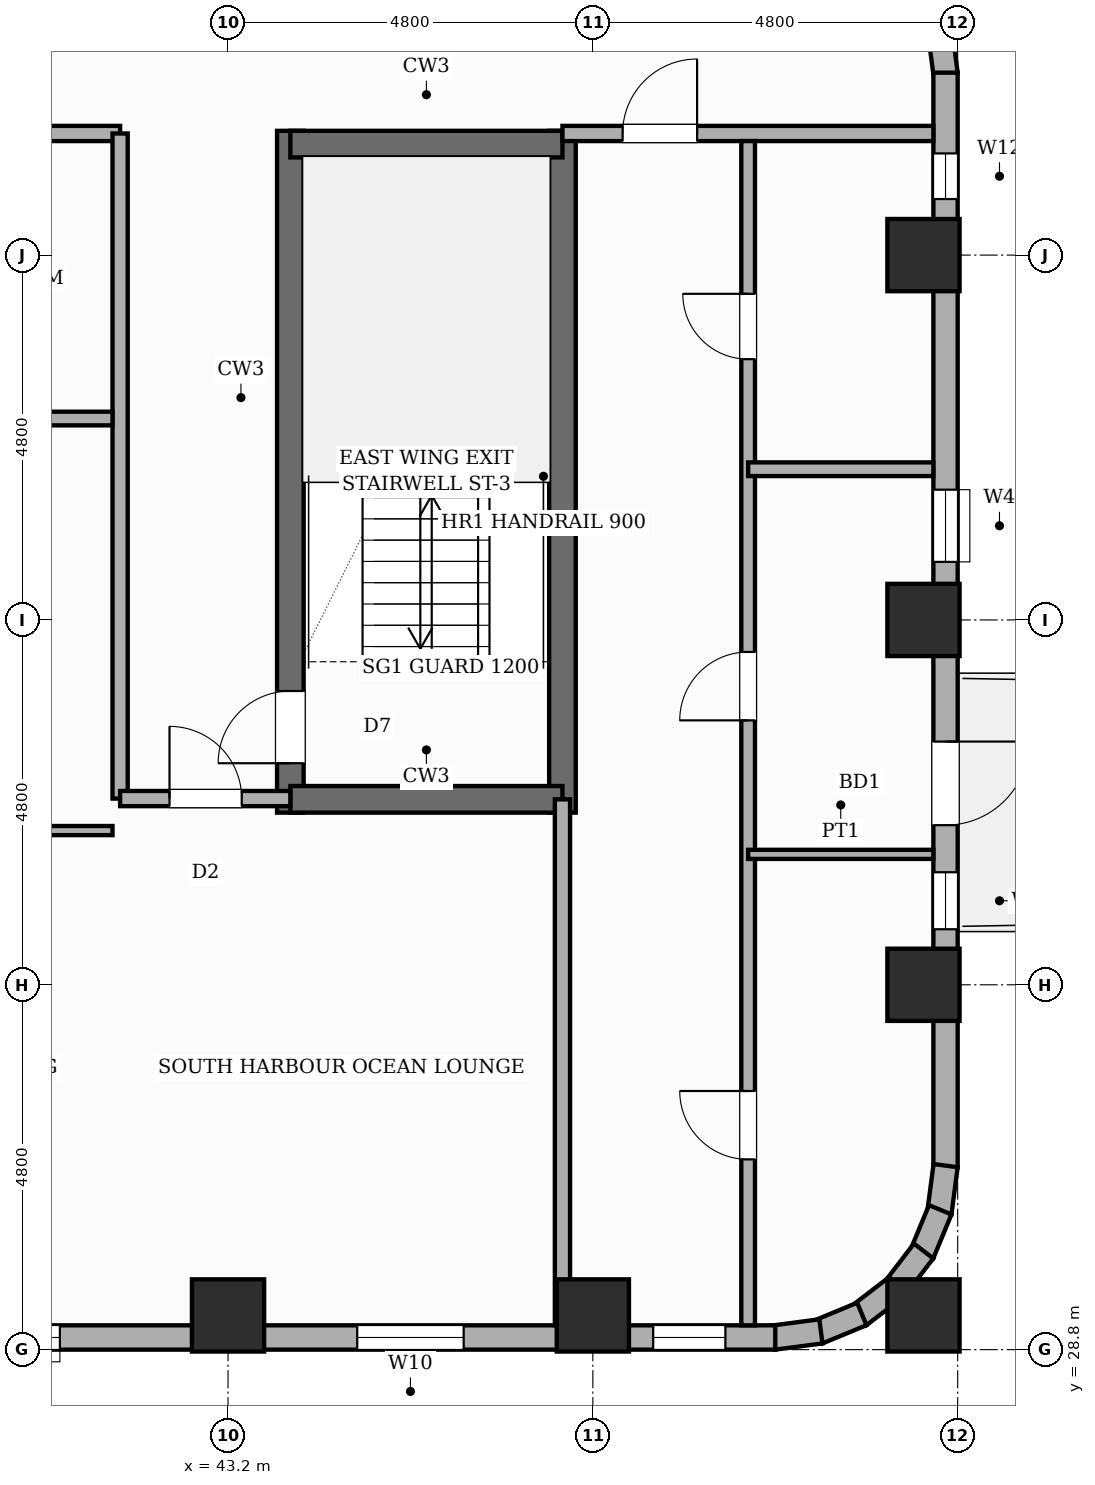
"""IFC4 building model, lengths in metres.
Left out: names, types, materials, properties, quantities, classifications, styles, units other than length and angle.
Written with IfcOpenShell. Run it as: python <this file> out.ifc"""

import sys

from ifc_helpers import new_model, si_unit, direction, frame, frame_2d, origin, origin_2d, place, context, subcontext, project, spatial, rectangle, extrude, element, fill, save


model = new_model("IFC4")
c1 = context("Model", 3, precision=1e-05, world=origin(), true_north=direction((0.0, 1.0)))
c2 = subcontext(c1, "Body", "Model", "MODEL_VIEW")
j1 = project(units=[si_unit("LENGTHUNIT", "METRE"), si_unit("PLANEANGLEUNIT", "RADIAN")], contexts=[c1])
p1 = place(None, origin())
s1 = spatial("IfcSite", under=j1, at=p1, CompositionType="ELEMENT")
p2 = place(p1, origin())
s2 = spatial("IfcBuilding", under=s1, at=p2, CompositionType="ELEMENT")
p3 = place(p2, frame((0.0, 0.0, 110.8)))
s3 = spatial("IfcBuildingStorey", under=s2, at=p3, CompositionType="ELEMENT", Elevation=110.8)
p4 = place(p3, frame((44.02, 35.865, 0.0), z_axis=(0.0, 0.0, 1.0), x_axis=(0.0, 1.0, 0.0)))
e1 = element("IfcWall", 1, at=p4, inside=s3, PredefinedType="SHEAR", context=c2, shape_type="SweptSolid", body=[
    extrude(rectangle(XDim=8.97, YDim=0.35, at=frame_2d((4.485, 0.0))), origin(), (0.0, 0.0, 1.0), 3.6),
])
p5 = place(p4, frame((0.65, 0.0, 0.0)))
e2 = element("IfcOpeningElement", 2, at=p5, cuts=e1, PredefinedType="OPENING", context=c2, shape_type="SweptSolid", body=[
    extrude(rectangle(XDim=0.95, YDim=2.1, at=frame_2d((0.475, 1.05))), frame((0.0, 0.185, 0.0), z_axis=(0.0, -1.0, 0.0), x_axis=(1.0, 0.0, 0.0)), (0.0, 0.0, 1.0), 0.37),
])
p6 = place(p3, frame((47.6, 35.865, 0.0), z_axis=(0.0, 0.0, 1.0), x_axis=(0.0, 1.0, 0.0)))
e3 = element("IfcWall", 3, at=p6, inside=s3, PredefinedType="SHEAR", context=c2, shape_type="SweptSolid", body=[
    extrude(rectangle(XDim=8.97, YDim=0.35, at=frame_2d((4.485, 0.0))), origin(), (0.0, 0.0, 1.0), 3.6),
])
for number, where, z_axis, x_axis in (
    (4, (44.02, 36.04, 0.0), (0.0, 0.0, 1.0), (1.0, 0.0, 0.0)),
    (5, (44.02, 44.66, 0.0), (0.0, 0.0, 1.0), (1.0, 0.0, 0.0)),
):
    element("IfcWall", number, at=place(p3, frame(where, z_axis=z_axis, x_axis=x_axis)), inside=s3, PredefinedType="SHEAR", context=c2, shape_type="SweptSolid", body=[
        extrude(rectangle(XDim=3.58, YDim=0.35, at=frame_2d((1.79, 0.0))), origin(), (0.0, 0.0, 1.0), 3.6),
    ])
for number, where, z_axis, x_axis in (
    (6, (43.2, 29.25, 0.0), (0.0, 0.0, 1.0), (1.0, 0.0, 0.0)),
    (7, (48.0, 29.25, 0.0), (0.0, 0.0, 1.0), (1.0, 0.0, 0.0)),
    (8, (52.35, 29.25, 0.0), (0.0, 0.0, 1.0), (1.0, 0.0, 0.0)),
    (9, (52.35, 33.6, 0.0), (0.0, 0.0, 1.0), (1.0, 0.0, 0.0)),
    (10, (52.35, 38.4, 0.0), (0.0, 0.0, 1.0), (1.0, 0.0, 0.0)),
    (11, (52.35, 43.2, 0.0), (0.0, 0.0, 1.0), (1.0, 0.0, 0.0)),
):
    element("IfcColumn", number, at=place(p3, frame(where, z_axis=z_axis, x_axis=x_axis)), inside=s3, PredefinedType="COLUMN", context=c2, shape_type="SweptSolid", body=[
        extrude(rectangle(XDim=0.95, YDim=0.95, at=origin_2d()), origin(), (0.0, 0.0, 1.0), 3.6),
    ])
p7 = place(p3, frame((52.56, 46.2, 0.0), z_axis=(0.0, 0.0, 1.0), x_axis=(0.130555323746, -0.9914410257, 0.0)))
e12 = element("IfcWall", 12, at=p7, inside=s3, PredefinedType="STANDARD", context=c2, shape_type="SweptSolid", body=[
    extrude(rectangle(XDim=0.626, YDim=0.32, at=frame_2d((0.313, 0.0))), origin(), (0.0, 0.0, 1.0), 2.54),
])
p8 = place(p3, frame((52.64, 45.6, 0.0), z_axis=(0.0, 0.0, 1.0), x_axis=(0.0, -1.0, 0.0)))
e13 = element("IfcWall", 13, at=p8, inside=s3, PredefinedType="STANDARD", context=c2, shape_type="SweptSolid", body=[
    extrude(rectangle(XDim=14.4, YDim=0.32, at=frame_2d((7.2, 0.0))), origin(), (0.0, 0.0, 1.0), 2.54),
])
p9 = place(p8, frame((8.8, 0.0, 0.0)))
e14 = element("IfcOpeningElement", 14, at=p9, cuts=e13, PredefinedType="OPENING", context=c2, shape_type="SweptSolid", body=[
    extrude(rectangle(XDim=1.1, YDim=2.15, at=frame_2d((0.55, 1.075))), frame((0.0, 0.17, 0.0), z_axis=(0.0, -1.0, 0.0), x_axis=(1.0, 0.0, 0.0)), (0.0, 0.0, 1.0), 0.34),
])
p10 = place(p8, frame((10.52, 0.0, 0.45)))
e15 = element("IfcOpeningElement", 15, at=p10, cuts=e13, PredefinedType="OPENING", context=c2, shape_type="SweptSolid", body=[
    extrude(rectangle(XDim=0.75, YDim=1.8, at=frame_2d((0.375, 0.9))), frame((0.0, 0.17, 0.0), z_axis=(0.0, -1.0, 0.0), x_axis=(1.0, 0.0, 0.0)), (0.0, 0.0, 1.0), 0.34),
])
p11 = place(p8, frame((1.062, 0.0, 0.45)))
e16 = element("IfcOpeningElement", 16, at=p11, cuts=e13, PredefinedType="OPENING", context=c2, shape_type="SweptSolid", body=[
    extrude(rectangle(XDim=0.6, YDim=1.8, at=frame_2d((0.3, 0.9))), frame((0.0, 0.17, 0.0), z_axis=(0.0, -1.0, 0.0), x_axis=(1.0, 0.0, 0.0)), (0.0, 0.0, 1.0), 0.34),
])
p12 = place(p8, frame((5.486, 0.0, 0.45)))
e17 = element("IfcOpeningElement", 17, at=p12, cuts=e13, PredefinedType="OPENING", context=c2, shape_type="SweptSolid", body=[
    extrude(rectangle(XDim=0.95, YDim=1.8, at=frame_2d((0.475, 0.9))), frame((0.0, 0.17, 0.0), z_axis=(0.0, -1.0, 0.0), x_axis=(1.0, 0.0, 0.0)), (0.0, 0.0, 1.0), 0.34),
])
p13 = place(p3, frame((52.641, 31.221, 0.0), z_axis=(0.0, 0.0, 1.0), x_axis=(-0.130504898859, -0.991447664465, 0.0)))
e18 = element("IfcWall", 18, at=p13, inside=s3, PredefinedType="STANDARD", context=c2, shape_type="SweptSolid", body=[
    extrude(rectangle(XDim=0.627, YDim=0.32, at=frame_2d((0.313, 0.0))), origin(), (0.0, 0.0, 1.0), 2.54),
])
p14 = place(p3, frame((52.57, 30.64, 0.0), z_axis=(0.0, 0.0, 1.0), x_axis=(-0.382455093999, -0.923974080304, 0.0)))
e19 = element("IfcWall", 19, at=p14, inside=s3, PredefinedType="STANDARD", context=c2, shape_type="SweptSolid", body=[
    extrude(rectangle(XDim=0.626, YDim=0.32, at=frame_2d((0.313, 0.0))), origin(), (0.0, 0.0, 1.0), 2.54),
])
p15 = place(p3, frame((52.352, 30.097, 0.0), z_axis=(0.0, 0.0, 1.0), x_axis=(-0.608693302629, -0.793405610854, 0.0)))
e20 = element("IfcWall", 20, at=p15, inside=s3, PredefinedType="STANDARD", context=c2, shape_type="SweptSolid", body=[
    extrude(rectangle(XDim=0.626, YDim=0.32, at=frame_2d((0.313, 0.0))), origin(), (0.0, 0.0, 1.0), 2.54),
])
p16 = place(p3, frame((52.0, 29.63, 0.0), z_axis=(0.0, 0.0, 1.0), x_axis=(-0.7932174212, -0.608938521285, 0.0)))
e21 = element("IfcWall", 21, at=p16, inside=s3, PredefinedType="STANDARD", context=c2, shape_type="SweptSolid", body=[
    extrude(rectangle(XDim=0.627, YDim=0.32, at=frame_2d((0.313, 0.0))), origin(), (0.0, 0.0, 1.0), 2.54),
])
for number, where, z_axis, x_axis in (
    (22, (51.539, 29.269, 0.0), (0.0, 0.0, 1.0), (-0.924, -0.383, 0.0)),
    (23, (51.0, 29.04, 0.0), (0.0, 0.0, 1.0), (-0.991, -0.131, 0.0)),
):
    element("IfcWall", number, at=place(p3, frame(where, z_axis=z_axis, x_axis=x_axis)), inside=s3, PredefinedType="STANDARD", context=c2, shape_type="SweptSolid", body=[
        extrude(rectangle(XDim=0.626, YDim=0.32, at=frame_2d((0.313, 0.0))), origin(), (0.0, 0.0, 1.0), 2.54),
    ])
p17 = place(p3, frame((50.4, 28.96, 0.0), z_axis=(0.0, 0.0, 1.0), x_axis=(-1.0, 0.0, 0.0)))
e24 = element("IfcWall", 24, at=p17, inside=s3, PredefinedType="STANDARD", context=c2, shape_type="SweptSolid", body=[
    extrude(rectangle(XDim=24.0, YDim=0.32, at=frame_2d((12.0, 0.0))), origin(), (0.0, 0.0, 1.0), 2.54),
])
p18 = place(p17, frame((19.278, 0.0, 0.65)))
e25 = element("IfcOpeningElement", 25, at=p18, cuts=e24, PredefinedType="OPENING", context=c2, shape_type="SweptSolid", body=[
    extrude(rectangle(XDim=1.4, YDim=1.1, at=frame_2d((0.7, 0.55))), frame((0.0, 0.17, 0.0), z_axis=(0.0, -1.0, 0.0), x_axis=(1.0, 0.0, 0.0)), (0.0, 0.0, 1.0), 0.34),
])
p19 = place(p17, frame((13.76, 0.0, 0.65)))
e26 = element("IfcOpeningElement", 26, at=p19, cuts=e24, PredefinedType="OPENING", context=c2, shape_type="SweptSolid", body=[
    extrude(rectangle(XDim=1.4, YDim=1.1, at=frame_2d((0.7, 0.55))), frame((0.0, 0.17, 0.0), z_axis=(0.0, -1.0, 0.0), x_axis=(1.0, 0.0, 0.0)), (0.0, 0.0, 1.0), 0.34),
])
p20 = place(p17, frame((22.555, 0.0, 0.45)))
e27 = element("IfcOpeningElement", 27, at=p20, cuts=e24, PredefinedType="OPENING", context=c2, shape_type="SweptSolid", body=[
    extrude(rectangle(XDim=0.95, YDim=1.8, at=frame_2d((0.475, 0.9))), frame((0.0, 0.17, 0.0), z_axis=(0.0, -1.0, 0.0), x_axis=(1.0, 0.0, 0.0)), (0.0, 0.0, 1.0), 0.34),
])
p21 = place(p17, frame((4.1, 0.0, 0.65)))
e28 = element("IfcOpeningElement", 28, at=p21, cuts=e24, PredefinedType="OPENING", context=c2, shape_type="SweptSolid", body=[
    extrude(rectangle(XDim=1.4, YDim=1.1, at=frame_2d((0.7, 0.55))), frame((0.0, 0.17, 0.0), z_axis=(0.0, -1.0, 0.0), x_axis=(1.0, 0.0, 0.0)), (0.0, 0.0, 1.0), 0.34),
])
p22 = place(p17, frame((17.598, 0.0, 0.45)))
e29 = element("IfcOpeningElement", 29, at=p22, cuts=e24, PredefinedType="OPENING", context=c2, shape_type="SweptSolid", body=[
    extrude(rectangle(XDim=0.95, YDim=1.8, at=frame_2d((0.475, 0.9))), frame((0.0, 0.17, 0.0), z_axis=(0.0, -1.0, 0.0), x_axis=(1.0, 0.0, 0.0)), (0.0, 0.0, 1.0), 0.34),
])
p23 = place(p17, frame((9.413, 0.0, 0.65)))
e30 = element("IfcOpeningElement", 30, at=p23, cuts=e24, PredefinedType="OPENING", context=c2, shape_type="SweptSolid", body=[
    extrude(rectangle(XDim=1.4, YDim=1.1, at=frame_2d((0.7, 0.55))), frame((0.0, 0.17, 0.0), z_axis=(0.0, -1.0, 0.0), x_axis=(1.0, 0.0, 0.0)), (0.0, 0.0, 1.0), 0.34),
])
p24 = place(p17, frame((0.656, 0.0, 0.45)))
e31 = element("IfcOpeningElement", 31, at=p24, cuts=e24, PredefinedType="OPENING", context=c2, shape_type="SweptSolid", body=[
    extrude(rectangle(XDim=0.95, YDim=1.8, at=frame_2d((0.475, 0.9))), frame((0.0, 0.17, 0.0), z_axis=(0.0, -1.0, 0.0), x_axis=(1.0, 0.0, 0.0)), (0.0, 0.0, 1.0), 0.34),
])
p25 = place(p3, frame((25.5, 44.8, 0.0), z_axis=(0.0, 0.0, 1.0), x_axis=(1.0, 0.0, 0.0)))
e32 = element("IfcWall", 32, at=p25, inside=s3, PredefinedType="PARTITIONING", context=c2, shape_type="SweptSolid", body=[
    extrude(rectangle(XDim=16.28, YDim=0.2, at=frame_2d((8.14, 0.0))), origin(), (0.0, 0.0, 1.0), 3.36),
])
p26 = place(p25, frame((0.9, 0.0, 0.0)))
e33 = element("IfcOpeningElement", 33, at=p26, cuts=e32, PredefinedType="OPENING", context=c2, shape_type="SweptSolid", body=[
    extrude(rectangle(XDim=0.95, YDim=2.15, at=frame_2d((0.475, 1.075))), frame((0.0, 0.11, 0.0), z_axis=(0.0, -1.0, 0.0), x_axis=(1.0, 0.0, 0.0)), (0.0, 0.0, 1.0), 0.22),
])
p27 = place(p25, frame((3.988, 0.0, 0.0)))
e34 = element("IfcOpeningElement", 34, at=p27, cuts=e32, PredefinedType="OPENING", context=c2, shape_type="SweptSolid", body=[
    extrude(rectangle(XDim=0.98, YDim=2.18, at=frame_2d((0.49, 1.09))), frame((0.0, 0.11, 0.0), z_axis=(0.0, -1.0, 0.0), x_axis=(1.0, 0.0, 0.0)), (0.0, 0.0, 1.0), 0.22),
])
p28 = place(p25, frame((9.99, 0.0, 0.0)))
e35 = element("IfcOpeningElement", 35, at=p28, cuts=e32, PredefinedType="OPENING", context=c2, shape_type="SweptSolid", body=[
    extrude(rectangle(XDim=0.98, YDim=2.18, at=frame_2d((0.49, 1.09))), frame((0.0, 0.11, 0.0), z_axis=(0.0, -1.0, 0.0), x_axis=(1.0, 0.0, 0.0)), (0.0, 0.0, 1.0), 0.22),
])
p29 = place(p3, frame((47.6, 44.8, 0.0), z_axis=(0.0, 0.0, 1.0), x_axis=(1.0, 0.0, 0.0)))
e36 = element("IfcWall", 36, at=p29, inside=s3, PredefinedType="PARTITIONING", context=c2, shape_type="SweptSolid", body=[
    extrude(rectangle(XDim=4.88, YDim=0.2, at=frame_2d((2.44, 0.0))), origin(), (0.0, 0.0, 1.0), 3.36),
])
p30 = place(p29, frame((0.792, 0.0, 0.0)))
e37 = element("IfcOpeningElement", 37, at=p30, cuts=e36, PredefinedType="OPENING", context=c2, shape_type="SweptSolid", body=[
    extrude(rectangle(XDim=0.98, YDim=2.18, at=frame_2d((0.49, 1.09))), frame((0.0, 0.11, 0.0), z_axis=(0.0, -1.0, 0.0), x_axis=(1.0, 0.0, 0.0)), (0.0, 0.0, 1.0), 0.22),
])
p31 = place(p3, frame((41.78, 36.05, 0.0), z_axis=(0.0, 0.0, 1.0), x_axis=(0.0, 1.0, 0.0)))
e38 = element("IfcWall", 38, at=p31, inside=s3, PredefinedType="PARTITIONING", context=c2, shape_type="SweptSolid", body=[
    extrude(rectangle(XDim=8.75, YDim=0.2, at=frame_2d((4.375, 0.0))), origin(), (0.0, 0.0, 1.0), 3.36),
])
p32 = place(p3, frame((41.78, 36.05, 0.0), z_axis=(0.0, 0.0, 1.0), x_axis=(1.0, 0.0, 0.0)))
e39 = element("IfcWall", 39, at=p32, inside=s3, PredefinedType="PARTITIONING", context=c2, shape_type="SweptSolid", body=[
    extrude(rectangle(XDim=2.24, YDim=0.2, at=frame_2d((1.12, 0.0))), origin(), (0.0, 0.0, 1.0), 3.36),
])
p33 = place(p32, frame((0.65, 0.0, 0.0)))
e40 = element("IfcOpeningElement", 40, at=p33, cuts=e39, PredefinedType="OPENING", context=c2, shape_type="SweptSolid", body=[
    extrude(rectangle(XDim=0.95, YDim=2.15, at=frame_2d((0.475, 1.075))), frame((0.0, 0.11, 0.0), z_axis=(0.0, -1.0, 0.0), x_axis=(1.0, 0.0, 0.0)), (0.0, 0.0, 1.0), 0.22),
])
p34 = place(p3, frame((37.08, 35.629, 0.0), z_axis=(0.0, 0.0, 1.0), x_axis=(1.0, 0.0, 0.0)))
e41 = element("IfcWall", 41, at=p34, inside=s3, PredefinedType="PARTITIONING", context=c2, shape_type="SweptSolid", body=[
    extrude(rectangle(XDim=4.6, YDim=0.12, at=frame_2d((2.3, 0.0))), origin(), (0.0, 0.0, 1.0), 3.36),
])
p35 = place(p3, frame((37.08, 41.05, 0.0), z_axis=(0.0, 0.0, 1.0), x_axis=(1.0, 0.0, 0.0)))
e42 = element("IfcWall", 42, at=p35, inside=s3, PredefinedType="PLUMBINGWALL", context=c2, shape_type="SweptSolid", body=[
    extrude(rectangle(XDim=4.6, YDim=0.18, at=frame_2d((2.3, 0.0))), origin(), (0.0, 0.0, 1.0), 3.36),
])
p36 = place(p3, frame((47.6, 29.12, 0.0), z_axis=(0.0, 0.0, 1.0), x_axis=(0.0, 1.0, 0.0)))
e43 = element("IfcWall", 43, at=p36, inside=s3, PredefinedType="SOLIDWALL", context=c2, shape_type="SweptSolid", body=[
    extrude(rectangle(XDim=6.92, YDim=0.2, at=frame_2d((3.46, 0.0))), origin(), (0.0, 0.0, 1.0), 3.36),
])
p37 = place(p3, frame((50.043, 29.12, 0.0), z_axis=(0.0, 0.0, 1.0), x_axis=(0.0, 1.0, 0.0)))
e44 = element("IfcWall", 44, at=p37, inside=s3, PredefinedType="PLUMBINGWALL", context=c2, shape_type="SweptSolid", body=[
    extrude(rectangle(XDim=15.58, YDim=0.18, at=frame_2d((7.79, 0.0))), origin(), (0.0, 0.0, 1.0), 3.36),
])
p38 = place(p37, frame((2.183, 0.0, 0.0)))
e45 = element("IfcOpeningElement", 45, at=p38, cuts=e44, PredefinedType="OPENING", context=c2, shape_type="SweptSolid", body=[
    extrude(rectangle(XDim=0.9, YDim=2.15, at=frame_2d((0.45, 1.075))), frame((0.0, 0.1, 0.0), z_axis=(0.0, -1.0, 0.0), x_axis=(1.0, 0.0, 0.0)), (0.0, 0.0, 1.0), 0.2),
])
p39 = place(p37, frame((7.959, 0.0, 0.0)))
e46 = element("IfcOpeningElement", 46, at=p39, cuts=e44, PredefinedType="OPENING", context=c2, shape_type="SweptSolid", body=[
    extrude(rectangle(XDim=0.9, YDim=2.15, at=frame_2d((0.45, 1.075))), frame((0.0, 0.1, 0.0), z_axis=(0.0, -1.0, 0.0), x_axis=(1.0, 0.0, 0.0)), (0.0, 0.0, 1.0), 0.2),
])
p40 = place(p37, frame((12.711, 0.0, 0.0)))
e47 = element("IfcOpeningElement", 47, at=p40, cuts=e44, PredefinedType="OPENING", context=c2, shape_type="SweptSolid", body=[
    extrude(rectangle(XDim=0.86, YDim=2.1, at=frame_2d((0.43, 1.05))), frame((0.0, 0.1, 0.0), z_axis=(0.0, -1.0, 0.0), x_axis=(1.0, 0.0, 0.0)), (0.0, 0.0, 1.0), 0.2),
])
p41 = place(p3, frame((50.043, 35.316, 0.0), z_axis=(0.0, 0.0, 1.0), x_axis=(1.0, 0.0, 0.0)))
e48 = element("IfcWall", 48, at=p41, inside=s3, PredefinedType="PARTITIONING", context=c2, shape_type="SweptSolid", body=[
    extrude(rectangle(XDim=2.437, YDim=0.12, at=frame_2d((1.219, 0.0))), origin(), (0.0, 0.0, 1.0), 3.36),
])
p42 = place(p3, frame((50.043, 40.383, 0.0), z_axis=(0.0, 0.0, 1.0), x_axis=(1.0, 0.0, 0.0)))
e49 = element("IfcWall", 49, at=p42, inside=s3, PredefinedType="PLUMBINGWALL", context=c2, shape_type="SweptSolid", body=[
    extrude(rectangle(XDim=2.437, YDim=0.18, at=frame_2d((1.219, 0.0))), origin(), (0.0, 0.0, 1.0), 3.36),
])
p43 = place(p9, origin())
e50 = element("IfcDoor", 50, at=p43, inside=s3, OperationType="SINGLE_SWING_LEFT", PredefinedType="DOOR", context=c2, shape_type="SweptSolid", body=[
    extrude(rectangle(XDim=1.1, YDim=2.15, at=frame_2d((0.55, 1.075))), frame((0.0, 0.025, 0.0), z_axis=(0.0, -1.0, 0.0), x_axis=(1.0, 0.0, 0.0)), (0.0, 0.0, 1.0), 0.05),
])
fill(e14, e50)
p44 = place(p10, origin())
e51 = element("IfcWindow", 51, at=p44, inside=s3, PartitioningType="SINGLE_PANEL", PredefinedType="WINDOW", context=c2, shape_type="SweptSolid", body=[
    extrude(rectangle(XDim=0.75, YDim=1.8, at=frame_2d((0.375, 0.9))), frame((0.0, 0.03, 0.0), z_axis=(0.0, -1.0, 0.0), x_axis=(1.0, 0.0, 0.0)), (0.0, 0.0, 1.0), 0.06),
])
fill(e15, e51)
p45 = place(p11, origin())
e52 = element("IfcWindow", 52, at=p45, inside=s3, PartitioningType="SINGLE_PANEL", PredefinedType="WINDOW", context=c2, shape_type="SweptSolid", body=[
    extrude(rectangle(XDim=0.6, YDim=1.8, at=frame_2d((0.3, 0.9))), frame((0.0, 0.03, 0.0), z_axis=(0.0, -1.0, 0.0), x_axis=(1.0, 0.0, 0.0)), (0.0, 0.0, 1.0), 0.06),
])
fill(e16, e52)
p46 = place(p12, origin())
e53 = element("IfcWindow", 53, at=p46, inside=s3, PartitioningType="SINGLE_PANEL", PredefinedType="WINDOW", context=c2, shape_type="SweptSolid", body=[
    extrude(rectangle(XDim=0.95, YDim=1.8, at=frame_2d((0.475, 0.9))), frame((0.0, 0.03, 0.0), z_axis=(0.0, -1.0, 0.0), x_axis=(1.0, 0.0, 0.0)), (0.0, 0.0, 1.0), 0.06),
])
fill(e17, e53)
p47 = place(p21, origin())
e54 = element("IfcWindow", 54, at=p47, inside=s3, PartitioningType="SINGLE_PANEL", PredefinedType="WINDOW", context=c2, shape_type="SweptSolid", body=[
    extrude(rectangle(XDim=1.4, YDim=1.1, at=frame_2d((0.7, 0.55))), frame((0.0, 0.03, 0.0), z_axis=(0.0, -1.0, 0.0), x_axis=(1.0, 0.0, 0.0)), (0.0, 0.0, 1.0), 0.06),
])
fill(e28, e54)
p48 = place(p23, origin())
e55 = element("IfcWindow", 55, at=p48, inside=s3, PartitioningType="SINGLE_PANEL", PredefinedType="WINDOW", context=c2, shape_type="SweptSolid", body=[
    extrude(rectangle(XDim=1.4, YDim=1.1, at=frame_2d((0.7, 0.55))), frame((0.0, 0.03, 0.0), z_axis=(0.0, -1.0, 0.0), x_axis=(1.0, 0.0, 0.0)), (0.0, 0.0, 1.0), 0.06),
])
fill(e30, e55)
p49 = place(p24, origin())
e56 = element("IfcWindow", 56, at=p49, inside=s3, PartitioningType="SINGLE_PANEL", PredefinedType="WINDOW", context=c2, shape_type="SweptSolid", body=[
    extrude(rectangle(XDim=0.95, YDim=1.8, at=frame_2d((0.475, 0.9))), frame((0.0, 0.03, 0.0), z_axis=(0.0, -1.0, 0.0), x_axis=(1.0, 0.0, 0.0)), (0.0, 0.0, 1.0), 0.06),
])
fill(e31, e56)
p50 = place(p5, origin())
e57 = element("IfcDoor", 57, at=p50, inside=s3, OperationType="SINGLE_SWING_LEFT", PredefinedType="DOOR", context=c2, shape_type="SweptSolid", body=[
    extrude(rectangle(XDim=0.95, YDim=2.1, at=frame_2d((0.475, 1.05))), frame((0.0, 0.025, 0.0), z_axis=(0.0, -1.0, 0.0), x_axis=(1.0, 0.0, 0.0)), (0.0, 0.0, 1.0), 0.05),
])
fill(e2, e57)
p51 = place(p33, origin())
e58 = element("IfcDoor", 58, at=p51, inside=s3, OperationType="SINGLE_SWING_LEFT", PredefinedType="DOOR", context=c2, shape_type="SweptSolid", body=[
    extrude(rectangle(XDim=0.95, YDim=2.15, at=frame_2d((0.475, 1.075))), frame((0.0, 0.025, 0.0), z_axis=(0.0, -1.0, 0.0), x_axis=(1.0, 0.0, 0.0)), (0.0, 0.0, 1.0), 0.05),
])
fill(e40, e58)
p52 = place(p30, origin())
e59 = element("IfcDoor", 59, at=p52, inside=s3, OperationType="SINGLE_SWING_RIGHT", PredefinedType="DOOR", context=c2, shape_type="SweptSolid", body=[
    extrude(rectangle(XDim=0.98, YDim=2.18, at=frame_2d((0.49, 1.09))), frame((0.0, 0.025, 0.0), z_axis=(0.0, -1.0, 0.0), x_axis=(1.0, 0.0, 0.0)), (0.0, 0.0, 1.0), 0.05),
])
fill(e37, e59)
p53 = place(p38, origin())
e60 = element("IfcDoor", 60, at=p53, inside=s3, OperationType="SINGLE_SWING_RIGHT", PredefinedType="DOOR", context=c2, shape_type="SweptSolid", body=[
    extrude(rectangle(XDim=0.9, YDim=2.15, at=frame_2d((0.45, 1.075))), frame((0.0, 0.025, 0.0), z_axis=(0.0, -1.0, 0.0), x_axis=(1.0, 0.0, 0.0)), (0.0, 0.0, 1.0), 0.05),
])
fill(e45, e60)
p54 = place(p39, origin())
e61 = element("IfcDoor", 61, at=p54, inside=s3, OperationType="SINGLE_SWING_LEFT", PredefinedType="DOOR", context=c2, shape_type="SweptSolid", body=[
    extrude(rectangle(XDim=0.9, YDim=2.15, at=frame_2d((0.45, 1.075))), frame((0.0, 0.025, 0.0), z_axis=(0.0, -1.0, 0.0), x_axis=(1.0, 0.0, 0.0)), (0.0, 0.0, 1.0), 0.05),
])
fill(e46, e61)
p55 = place(p40, origin())
e62 = element("IfcDoor", 62, at=p55, inside=s3, OperationType="SINGLE_SWING_RIGHT", PredefinedType="DOOR", context=c2, shape_type="SweptSolid", body=[
    extrude(rectangle(XDim=0.86, YDim=2.1, at=frame_2d((0.43, 1.05))), frame((0.0, 0.025, 0.0), z_axis=(0.0, -1.0, 0.0), x_axis=(1.0, 0.0, 0.0)), (0.0, 0.0, 1.0), 0.05),
])
fill(e47, e62)
save(model, sys.argv[1])
